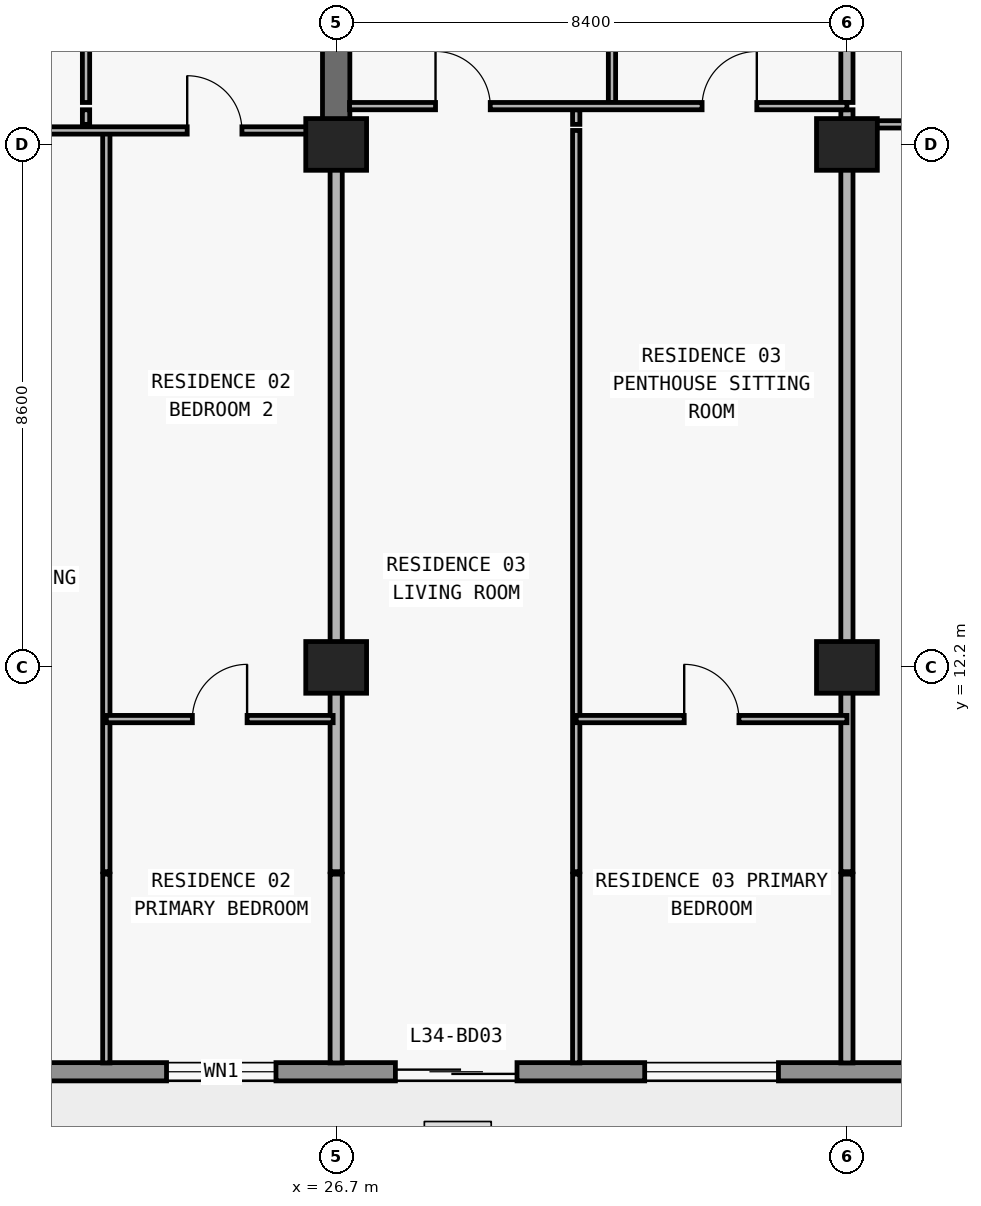
"""IFC4 building model, lengths in metres.
Left out: names, types, materials, properties, quantities, classifications, styles, units other than length and angle.
Written with IfcOpenShell. Run it as: python <this file> out.ifc"""

import sys

from ifc_helpers import new_model, si_unit, direction, frame, frame_2d, origin, origin_2d, place, context, subcontext, project, spatial, rectangle, extrude, element, fill, save


model = new_model("IFC4")
c1 = context("Model", 3, precision=1e-05, world=origin(), true_north=direction((0.0, 1.0)))
c2 = subcontext(c1, "Body", "Model", "MODEL_VIEW")
j1 = project(units=[si_unit("LENGTHUNIT", "METRE"), si_unit("PLANEANGLEUNIT", "RADIAN")], contexts=[c1])
p1 = place(None, origin())
s1 = spatial("IfcSite", under=j1, at=p1, CompositionType="ELEMENT")
p2 = place(p1, origin())
s2 = spatial("IfcBuilding", under=s1, at=p2, CompositionType="ELEMENT")
p3 = place(p2, frame((0.0, 0.0, 125.7)))
s3 = spatial("IfcBuildingStorey", under=s2, at=p3, CompositionType="ELEMENT", Elevation=125.7)
for number, where, z_axis, x_axis in (
    (1, (26.7, 12.2, 0.0), (0.0, 0.0, 1.0), (1.0, 0.0, 0.0)),
    (2, (35.1, 12.2, 0.0), (0.0, 0.0, 1.0), (1.0, 0.0, 0.0)),
    (3, (26.7, 20.8, 0.0), (0.0, 0.0, 1.0), (1.0, 0.0, 0.0)),
    (4, (35.1, 20.8, 0.0), (0.0, 0.0, 1.0), (1.0, 0.0, 0.0)),
):
    element("IfcColumn", number, at=place(p3, frame(where, z_axis=z_axis, x_axis=x_axis)), inside=s3, PredefinedType="COLUMN", context=c2, shape_type="SweptSolid", body=[
        extrude(rectangle(XDim=1.0, YDim=0.85, at=origin_2d()), origin(), (0.0, 0.0, 1.0), 3.05),
    ])
p4 = place(p3, frame((26.7, 20.8, 0.0), z_axis=(0.0, 0.0, 1.0), x_axis=(0.0, 1.0, 0.0)))
e5 = element("IfcWall", 5, at=p4, inside=s3, PredefinedType="SHEAR", context=c2, shape_type="SweptSolid", body=[
    extrude(rectangle(XDim=8.6, YDim=0.45, at=frame_2d((4.3, 0.0))), origin(), (0.0, 0.0, 1.0), 3.05),
])
p5 = place(p3, frame((70.1, 5.55, 0.0), z_axis=(0.0, 0.0, 1.0), x_axis=(-1.0, 0.0, 0.0)))
e6 = element("IfcWall", 6, at=p5, inside=s3, PredefinedType="STANDARD", context=c2, shape_type="SweptSolid", body=[
    extrude(rectangle(XDim=62.4, YDim=0.3, at=frame_2d((31.2, 0.0))), origin(), (0.0, 0.0, 1.0), 3.05),
])
p6 = place(p5, frame((57.226, 0.0, 0.0)))
e7 = element("IfcOpeningElement", 7, at=p6, cuts=e6, PredefinedType="OPENING", context=c2, shape_type="SweptSolid", body=[
    extrude(rectangle(XDim=2.0, YDim=2.3, at=frame_2d((1.0, 1.15))), frame((0.0, 0.16, 0.0), z_axis=(0.0, -1.0, 0.0), x_axis=(1.0, 0.0, 0.0)), (0.0, 0.0, 1.0), 0.32),
])
p7 = place(p5, frame((52.926, 0.0, 0.85)))
e8 = element("IfcOpeningElement", 8, at=p7, cuts=e6, PredefinedType="OPENING", context=c2, shape_type="SweptSolid", body=[
    extrude(rectangle(XDim=2.2, YDim=1.55, at=frame_2d((1.1, 0.775))), frame((0.0, 0.16, 0.0), z_axis=(0.0, -1.0, 0.0), x_axis=(1.0, 0.0, 0.0)), (0.0, 0.0, 1.0), 0.32),
])
p8 = place(p5, frame((48.49, 0.0, 0.0)))
e9 = element("IfcOpeningElement", 9, at=p8, cuts=e6, PredefinedType="OPENING", context=c2, shape_type="SweptSolid", body=[
    extrude(rectangle(XDim=2.0, YDim=2.3, at=frame_2d((1.0, 1.15))), frame((0.0, 0.16, 0.0), z_axis=(0.0, -1.0, 0.0), x_axis=(1.0, 0.0, 0.0)), (0.0, 0.0, 1.0), 0.32),
])
p9 = place(p5, frame((44.39, 0.0, 0.85)))
e10 = element("IfcOpeningElement", 10, at=p9, cuts=e6, PredefinedType="OPENING", context=c2, shape_type="SweptSolid", body=[
    extrude(rectangle(XDim=1.8, YDim=1.55, at=frame_2d((0.9, 0.775))), frame((0.0, 0.16, 0.0), z_axis=(0.0, -1.0, 0.0), x_axis=(1.0, 0.0, 0.0)), (0.0, 0.0, 1.0), 0.32),
])
p10 = place(p5, frame((40.426, 0.0, 0.0)))
e11 = element("IfcOpeningElement", 11, at=p10, cuts=e6, PredefinedType="OPENING", context=c2, shape_type="SweptSolid", body=[
    extrude(rectangle(XDim=2.0, YDim=2.3, at=frame_2d((1.0, 1.15))), frame((0.0, 0.16, 0.0), z_axis=(0.0, -1.0, 0.0), x_axis=(1.0, 0.0, 0.0)), (0.0, 0.0, 1.0), 0.32),
])
p11 = place(p5, frame((36.126, 0.0, 0.85)))
e12 = element("IfcOpeningElement", 12, at=p11, cuts=e6, PredefinedType="OPENING", context=c2, shape_type="SweptSolid", body=[
    extrude(rectangle(XDim=2.2, YDim=1.55, at=frame_2d((1.1, 0.775))), frame((0.0, 0.16, 0.0), z_axis=(0.0, -1.0, 0.0), x_axis=(1.0, 0.0, 0.0)), (0.0, 0.0, 1.0), 0.32),
])
p12 = place(p5, frame((31.91, 0.0, 0.0)))
e13 = element("IfcOpeningElement", 13, at=p12, cuts=e6, PredefinedType="OPENING", context=c2, shape_type="SweptSolid", body=[
    extrude(rectangle(XDim=2.0, YDim=2.3, at=frame_2d((1.0, 1.15))), frame((0.0, 0.16, 0.0), z_axis=(0.0, -1.0, 0.0), x_axis=(1.0, 0.0, 0.0)), (0.0, 0.0, 1.0), 0.32),
])
p13 = place(p5, frame((28.21, 0.0, 0.85)))
e14 = element("IfcOpeningElement", 14, at=p13, cuts=e6, PredefinedType="OPENING", context=c2, shape_type="SweptSolid", body=[
    extrude(rectangle(XDim=1.8, YDim=1.55, at=frame_2d((0.9, 0.775))), frame((0.0, 0.16, 0.0), z_axis=(0.0, -1.0, 0.0), x_axis=(1.0, 0.0, 0.0)), (0.0, 0.0, 1.0), 0.32),
])
p14 = place(p5, frame((24.426, 0.0, 0.0)))
e15 = element("IfcOpeningElement", 15, at=p14, cuts=e6, PredefinedType="OPENING", context=c2, shape_type="SweptSolid", body=[
    extrude(rectangle(XDim=2.0, YDim=2.3, at=frame_2d((1.0, 1.15))), frame((0.0, 0.16, 0.0), z_axis=(0.0, -1.0, 0.0), x_axis=(1.0, 0.0, 0.0)), (0.0, 0.0, 1.0), 0.32),
])
p15 = place(p5, frame((20.126, 0.0, 0.85)))
e16 = element("IfcOpeningElement", 16, at=p15, cuts=e6, PredefinedType="OPENING", context=c2, shape_type="SweptSolid", body=[
    extrude(rectangle(XDim=2.2, YDim=1.55, at=frame_2d((1.1, 0.775))), frame((0.0, 0.16, 0.0), z_axis=(0.0, -1.0, 0.0), x_axis=(1.0, 0.0, 0.0)), (0.0, 0.0, 1.0), 0.32),
])
p16 = place(p5, frame((15.69, 0.0, 0.0)))
e17 = element("IfcOpeningElement", 17, at=p16, cuts=e6, PredefinedType="OPENING", context=c2, shape_type="SweptSolid", body=[
    extrude(rectangle(XDim=2.0, YDim=2.3, at=frame_2d((1.0, 1.15))), frame((0.0, 0.16, 0.0), z_axis=(0.0, -1.0, 0.0), x_axis=(1.0, 0.0, 0.0)), (0.0, 0.0, 1.0), 0.32),
])
p17 = place(p5, frame((11.59, 0.0, 0.85)))
e18 = element("IfcOpeningElement", 18, at=p17, cuts=e6, PredefinedType="OPENING", context=c2, shape_type="SweptSolid", body=[
    extrude(rectangle(XDim=1.8, YDim=1.55, at=frame_2d((0.9, 0.775))), frame((0.0, 0.16, 0.0), z_axis=(0.0, -1.0, 0.0), x_axis=(1.0, 0.0, 0.0)), (0.0, 0.0, 1.0), 0.32),
])
p18 = place(p5, frame((7.626, 0.0, 0.0)))
e19 = element("IfcOpeningElement", 19, at=p18, cuts=e6, PredefinedType="OPENING", context=c2, shape_type="SweptSolid", body=[
    extrude(rectangle(XDim=2.0, YDim=2.3, at=frame_2d((1.0, 1.15))), frame((0.0, 0.16, 0.0), z_axis=(0.0, -1.0, 0.0), x_axis=(1.0, 0.0, 0.0)), (0.0, 0.0, 1.0), 0.32),
])
p19 = place(p5, frame((3.326, 0.0, 0.85)))
e20 = element("IfcOpeningElement", 20, at=p19, cuts=e6, PredefinedType="OPENING", context=c2, shape_type="SweptSolid", body=[
    extrude(rectangle(XDim=2.2, YDim=1.55, at=frame_2d((1.1, 0.775))), frame((0.0, 0.16, 0.0), z_axis=(0.0, -1.0, 0.0), x_axis=(1.0, 0.0, 0.0)), (0.0, 0.0, 1.0), 0.32),
])
p20 = place(p3, frame((22.586, 21.13, 0.0), z_axis=(0.0, 0.0, 1.0), x_axis=(0.0, 1.0, 0.0)))
e21 = element("IfcWall", 21, at=p20, inside=s3, PredefinedType="PARTITIONING", context=c2, shape_type="SweptSolid", body=[
    extrude(rectangle(XDim=0.24, YDim=0.12, at=frame_2d((0.12, 0.0))), origin(), (0.0, 0.0, 1.0), 3.05),
])
p21 = place(p3, frame((22.586, 21.49, 0.0), z_axis=(0.0, 0.0, 1.0), x_axis=(0.0, 1.0, 0.0)))
e22 = element("IfcWall", 22, at=p21, inside=s3, PredefinedType="PARTITIONING", context=c2, shape_type="SweptSolid", body=[
    extrude(rectangle(XDim=4.69, YDim=0.12, at=frame_2d((2.345, 0.0))), origin(), (0.0, 0.0, 1.0), 3.05),
])
p22 = place(p21, frame((1.895, 0.0, 0.0)))
e23 = element("IfcOpeningElement", 23, at=p22, cuts=e22, PredefinedType="OPENING", context=c2, shape_type="SweptSolid", body=[
    extrude(rectangle(XDim=0.9, YDim=2.15, at=frame_2d((0.45, 1.075))), frame((0.0, 0.07, 0.0), z_axis=(0.0, -1.0, 0.0), x_axis=(1.0, 0.0, 0.0)), (0.0, 0.0, 1.0), 0.14),
])
p23 = place(p3, frame((22.92, 5.695, 0.0), z_axis=(0.0, 0.0, 1.0), x_axis=(0.0, 1.0, 0.0)))
e24 = element("IfcWall", 24, at=p23, inside=s3, PredefinedType="PARTITIONING", context=c2, shape_type="SweptSolid", body=[
    extrude(rectangle(XDim=3.105, YDim=0.12, at=frame_2d((1.552, 0.0))), origin(), (0.0, 0.0, 1.0), 3.05),
])
p24 = place(p3, frame((22.92, 8.84, 0.0), z_axis=(0.0, 0.0, 1.0), x_axis=(0.0, 1.0, 0.0)))
e25 = element("IfcWall", 25, at=p24, inside=s3, PredefinedType="PARTITIONING", context=c2, shape_type="SweptSolid", body=[
    extrude(rectangle(XDim=12.19, YDim=0.12, at=frame_2d((6.095, 0.0))), origin(), (0.0, 0.0, 1.0), 3.05),
])
p25 = place(p3, frame((26.7, 5.695, 0.0), z_axis=(0.0, 0.0, 1.0), x_axis=(0.0, 1.0, 0.0)))
e26 = element("IfcWall", 26, at=p25, inside=s3, PredefinedType="PARTITIONING", context=c2, shape_type="SweptSolid", body=[
    extrude(rectangle(XDim=3.105, YDim=0.2, at=frame_2d((1.552, 0.0))), origin(), (0.0, 0.0, 1.0), 3.05),
])
p26 = place(p3, frame((26.7, 8.84, 0.0), z_axis=(0.0, 0.0, 1.0), x_axis=(0.0, 1.0, 0.0)))
e27 = element("IfcWall", 27, at=p26, inside=s3, PredefinedType="PARTITIONING", context=c2, shape_type="SweptSolid", body=[
    extrude(rectangle(XDim=11.955, YDim=0.2, at=frame_2d((5.978, 0.0))), origin(), (0.0, 0.0, 1.0), 2.174),
])
p27 = place(p3, frame((30.648, 5.695, 0.0), z_axis=(0.0, 0.0, 1.0), x_axis=(0.0, 1.0, 0.0)))
e28 = element("IfcWall", 28, at=p27, inside=s3, PredefinedType="PARTITIONING", context=c2, shape_type="SweptSolid", body=[
    extrude(rectangle(XDim=3.105, YDim=0.12, at=frame_2d((1.552, 0.0))), origin(), (0.0, 0.0, 1.0), 3.05),
])
p28 = place(p3, frame((30.648, 8.84, 0.0), z_axis=(0.0, 0.0, 1.0), x_axis=(0.0, 1.0, 0.0)))
e29 = element("IfcWall", 29, at=p28, inside=s3, PredefinedType="PARTITIONING", context=c2, shape_type="SweptSolid", body=[
    extrude(rectangle(XDim=12.19, YDim=0.12, at=frame_2d((6.095, 0.0))), origin(), (0.0, 0.0, 1.0), 3.05),
])
p29 = place(p3, frame((30.648, 21.13, 0.0), z_axis=(0.0, 0.0, 1.0), x_axis=(0.0, 1.0, 0.0)))
e30 = element("IfcWall", 30, at=p29, inside=s3, PredefinedType="PARTITIONING", context=c2, shape_type="SweptSolid", body=[
    extrude(rectangle(XDim=0.24, YDim=0.12, at=frame_2d((0.12, 0.0))), origin(), (0.0, 0.0, 1.0), 3.05),
])
p30 = place(p3, frame((31.236, 21.49, 0.0), z_axis=(0.0, 0.0, 1.0), x_axis=(0.0, 1.0, 0.0)))
e31 = element("IfcWall", 31, at=p30, inside=s3, PredefinedType="PARTITIONING", context=c2, shape_type="SweptSolid", body=[
    extrude(rectangle(XDim=4.69, YDim=0.12, at=frame_2d((2.345, 0.0))), origin(), (0.0, 0.0, 1.0), 3.05),
])
p31 = place(p30, frame((1.895, 0.0, 0.0)))
e32 = element("IfcOpeningElement", 32, at=p31, cuts=e31, PredefinedType="OPENING", context=c2, shape_type="SweptSolid", body=[
    extrude(rectangle(XDim=0.9, YDim=2.15, at=frame_2d((0.45, 1.075))), frame((0.0, 0.07, 0.0), z_axis=(0.0, -1.0, 0.0), x_axis=(1.0, 0.0, 0.0)), (0.0, 0.0, 1.0), 0.14),
])
p32 = place(p3, frame((35.1, 5.695, 0.0), z_axis=(0.0, 0.0, 1.0), x_axis=(0.0, 1.0, 0.0)))
e33 = element("IfcWall", 33, at=p32, inside=s3, PredefinedType="PARTITIONING", context=c2, shape_type="SweptSolid", body=[
    extrude(rectangle(XDim=3.105, YDim=0.2, at=frame_2d((1.552, 0.0))), origin(), (0.0, 0.0, 1.0), 3.05),
])
p33 = place(p3, frame((35.1, 8.84, 0.0), z_axis=(0.0, 0.0, 1.0), x_axis=(0.0, 1.0, 0.0)))
e34 = element("IfcWall", 34, at=p33, inside=s3, PredefinedType="PARTITIONING", context=c2, shape_type="SweptSolid", body=[
    extrude(rectangle(XDim=12.19, YDim=0.2, at=frame_2d((6.095, 0.0))), origin(), (0.0, 0.0, 1.0), 2.174),
])
p34 = place(p3, frame((35.1, 21.13, 0.0), z_axis=(0.0, 0.0, 1.0), x_axis=(0.0, 1.0, 0.0)))
e35 = element("IfcWall", 35, at=p34, inside=s3, PredefinedType="PARTITIONING", context=c2, shape_type="SweptSolid", body=[
    extrude(rectangle(XDim=0.24, YDim=0.2, at=frame_2d((0.12, 0.0))), origin(), (0.0, 0.0, 1.0), 2.174),
])
p35 = place(p3, frame((35.1, 21.49, 0.0), z_axis=(0.0, 0.0, 1.0), x_axis=(0.0, 1.0, 0.0)))
e36 = element("IfcWall", 36, at=p35, inside=s3, PredefinedType="PARTITIONING", context=c2, shape_type="SweptSolid", body=[
    extrude(rectangle(XDim=4.69, YDim=0.2, at=frame_2d((2.345, 0.0))), origin(), (0.0, 0.0, 1.0), 2.174),
])
p36 = place(p3, frame((22.92, 11.35, 0.0), z_axis=(0.0, 0.0, 1.0), x_axis=(1.0, 0.0, 0.0)))
e37 = element("IfcWall", 37, at=p36, inside=s3, PredefinedType="PARTITIONING", context=c2, shape_type="SweptSolid", body=[
    extrude(rectangle(XDim=3.73, YDim=0.12, at=frame_2d((1.865, 0.0))), origin(), (0.0, 0.0, 1.0), 3.05),
])
p37 = place(p36, frame((1.415, 0.0, 0.0)))
e38 = element("IfcOpeningElement", 38, at=p37, cuts=e37, PredefinedType="OPENING", context=c2, shape_type="SweptSolid", body=[
    extrude(rectangle(XDim=0.9, YDim=2.15, at=frame_2d((0.45, 1.075))), frame((0.0, 0.07, 0.0), z_axis=(0.0, -1.0, 0.0), x_axis=(1.0, 0.0, 0.0)), (0.0, 0.0, 1.0), 0.14),
])
p38 = place(p3, frame((30.648, 11.35, 0.0), z_axis=(0.0, 0.0, 1.0), x_axis=(1.0, 0.0, 0.0)))
e39 = element("IfcWall", 39, at=p38, inside=s3, PredefinedType="PARTITIONING", context=c2, shape_type="SweptSolid", body=[
    extrude(rectangle(XDim=4.452, YDim=0.12, at=frame_2d((2.226, 0.0))), origin(), (0.0, 0.0, 1.0), 3.05),
])
p39 = place(p38, frame((1.776, 0.0, 0.0)))
e40 = element("IfcOpeningElement", 40, at=p39, cuts=e39, PredefinedType="OPENING", context=c2, shape_type="SweptSolid", body=[
    extrude(rectangle(XDim=0.9, YDim=2.15, at=frame_2d((0.45, 1.075))), frame((0.0, 0.07, 0.0), z_axis=(0.0, -1.0, 0.0), x_axis=(1.0, 0.0, 0.0)), (0.0, 0.0, 1.0), 0.14),
])
p40 = place(p3, frame((18.3, 21.03, 0.0), z_axis=(0.0, 0.0, 1.0), x_axis=(1.0, 0.0, 0.0)))
e41 = element("IfcWall", 41, at=p40, inside=s3, PredefinedType="PARTITIONING", context=c2, shape_type="SweptSolid", body=[
    extrude(rectangle(XDim=8.18, YDim=0.12, at=frame_2d((4.09, 0.0))), origin(), (0.0, 0.0, 1.0), 2.174),
])
p41 = place(p40, frame((1.693, 0.0, 0.0)))
e42 = element("IfcOpeningElement", 42, at=p41, cuts=e41, PredefinedType="OPENING", context=c2, shape_type="SweptSolid", body=[
    extrude(rectangle(XDim=0.9, YDim=2.124, at=frame_2d((0.45, 1.062))), frame((0.0, 0.07, 0.0), z_axis=(0.0, -1.0, 0.0), x_axis=(1.0, 0.0, 0.0)), (0.0, 0.0, 1.0), 0.14),
])
p42 = place(p40, frame((5.95, 0.0, 0.0)))
e43 = element("IfcOpeningElement", 43, at=p42, cuts=e41, PredefinedType="OPENING", context=c2, shape_type="SweptSolid", body=[
    extrude(rectangle(XDim=0.9, YDim=2.124, at=frame_2d((0.45, 1.062))), frame((0.0, 0.07, 0.0), z_axis=(0.0, -1.0, 0.0), x_axis=(1.0, 0.0, 0.0)), (0.0, 0.0, 1.0), 0.14),
])
p43 = place(p3, frame((35.1, 21.13, 0.0), z_axis=(0.0, 0.0, 1.0), x_axis=(1.0, 0.0, 0.0)))
e44 = element("IfcWall", 44, at=p43, inside=s3, PredefinedType="PARTITIONING", context=c2, shape_type="SweptSolid", body=[
    extrude(rectangle(XDim=7.6, YDim=0.12, at=frame_2d((3.8, 0.0))), origin(), (0.0, 0.0, 1.0), 2.174),
])
p44 = place(p43, frame((1.64, 0.0, 0.0)))
e45 = element("IfcOpeningElement", 45, at=p44, cuts=e44, PredefinedType="OPENING", context=c2, shape_type="SweptSolid", body=[
    extrude(rectangle(XDim=0.9, YDim=2.124, at=frame_2d((0.45, 1.062))), frame((0.0, 0.07, 0.0), z_axis=(0.0, -1.0, 0.0), x_axis=(1.0, 0.0, 0.0)), (0.0, 0.0, 1.0), 0.14),
])
p45 = place(p43, frame((5.527, 0.0, 0.0)))
e46 = element("IfcOpeningElement", 46, at=p45, cuts=e44, PredefinedType="OPENING", context=c2, shape_type="SweptSolid", body=[
    extrude(rectangle(XDim=0.9, YDim=2.124, at=frame_2d((0.45, 1.062))), frame((0.0, 0.07, 0.0), z_axis=(0.0, -1.0, 0.0), x_axis=(1.0, 0.0, 0.0)), (0.0, 0.0, 1.0), 0.14),
])
p46 = place(p3, frame((26.92, 21.43, 0.0), z_axis=(0.0, 0.0, 1.0), x_axis=(1.0, 0.0, 0.0)))
e47 = element("IfcWall", 47, at=p46, inside=s3, PredefinedType="PARTITIONING", context=c2, shape_type="SweptSolid", body=[
    extrude(rectangle(XDim=8.18, YDim=0.12, at=frame_2d((4.09, 0.0))), origin(), (0.0, 0.0, 1.0), 3.05),
])
p47 = place(p46, frame((1.414, 0.0, 0.0)))
e48 = element("IfcOpeningElement", 48, at=p47, cuts=e47, PredefinedType="OPENING", context=c2, shape_type="SweptSolid", body=[
    extrude(rectangle(XDim=0.9, YDim=2.15, at=frame_2d((0.45, 1.075))), frame((0.0, 0.07, 0.0), z_axis=(0.0, -1.0, 0.0), x_axis=(1.0, 0.0, 0.0)), (0.0, 0.0, 1.0), 0.14),
])
p48 = place(p46, frame((5.798, 0.0, 0.0)))
e49 = element("IfcOpeningElement", 49, at=p48, cuts=e47, PredefinedType="OPENING", context=c2, shape_type="SweptSolid", body=[
    extrude(rectangle(XDim=0.9, YDim=2.15, at=frame_2d((0.45, 1.075))), frame((0.0, 0.07, 0.0), z_axis=(0.0, -1.0, 0.0), x_axis=(1.0, 0.0, 0.0)), (0.0, 0.0, 1.0), 0.14),
])
p49 = place(p9, origin())
e50 = element("IfcWindow", 50, at=p49, inside=s3, PartitioningType="SINGLE_PANEL", PredefinedType="WINDOW", context=c2, shape_type="SweptSolid", body=[
    extrude(rectangle(XDim=1.8, YDim=1.55, at=frame_2d((0.9, 0.775))), frame((0.0, 0.03, 0.0), z_axis=(0.0, -1.0, 0.0), x_axis=(1.0, 0.0, 0.0)), (0.0, 0.0, 1.0), 0.06),
])
fill(e10, e50)
p50 = place(p10, origin())
e51 = element("IfcDoor", 51, at=p50, inside=s3, OperationType="DOUBLE_DOOR_SLIDING", PredefinedType="DOOR", context=c2, shape_type="SweptSolid", body=[
    extrude(rectangle(XDim=2.0, YDim=2.3, at=frame_2d((1.0, 1.15))), frame((0.0, 0.025, 0.0), z_axis=(0.0, -1.0, 0.0), x_axis=(1.0, 0.0, 0.0)), (0.0, 0.0, 1.0), 0.05),
])
fill(e11, e51)
p51 = place(p11, origin())
e52 = element("IfcWindow", 52, at=p51, inside=s3, PartitioningType="SINGLE_PANEL", PredefinedType="WINDOW", context=c2, shape_type="SweptSolid", body=[
    extrude(rectangle(XDim=2.2, YDim=1.55, at=frame_2d((1.1, 0.775))), frame((0.0, 0.03, 0.0), z_axis=(0.0, -1.0, 0.0), x_axis=(1.0, 0.0, 0.0)), (0.0, 0.0, 1.0), 0.06),
])
fill(e12, e52)
p52 = place(p42, origin())
e53 = element("IfcDoor", 53, at=p52, inside=s3, OperationType="SINGLE_SWING_LEFT", PredefinedType="DOOR", context=c2, shape_type="SweptSolid", body=[
    extrude(rectangle(XDim=0.9, YDim=2.124, at=frame_2d((0.45, 1.062))), frame((0.0, 0.025, 0.0), z_axis=(0.0, -1.0, 0.0), x_axis=(1.0, 0.0, 0.0)), (0.0, 0.0, 1.0), 0.05),
])
fill(e43, e53)
p53 = place(p37, origin())
e54 = element("IfcDoor", 54, at=p53, inside=s3, OperationType="SINGLE_SWING_RIGHT", PredefinedType="DOOR", context=c2, shape_type="SweptSolid", body=[
    extrude(rectangle(XDim=0.9, YDim=2.15, at=frame_2d((0.45, 1.075))), frame((0.0, 0.025, 0.0), z_axis=(0.0, -1.0, 0.0), x_axis=(1.0, 0.0, 0.0)), (0.0, 0.0, 1.0), 0.05),
])
fill(e38, e54)
p54 = place(p47, origin())
e55 = element("IfcDoor", 55, at=p54, inside=s3, OperationType="SINGLE_SWING_LEFT", PredefinedType="DOOR", context=c2, shape_type="SweptSolid", body=[
    extrude(rectangle(XDim=0.9, YDim=2.15, at=frame_2d((0.45, 1.075))), frame((0.0, 0.025, 0.0), z_axis=(0.0, -1.0, 0.0), x_axis=(1.0, 0.0, 0.0)), (0.0, 0.0, 1.0), 0.05),
])
fill(e48, e55)
p55 = place(p48, origin())
e56 = element("IfcDoor", 56, at=p55, inside=s3, OperationType="SINGLE_SWING_RIGHT", PredefinedType="DOOR", context=c2, shape_type="SweptSolid", body=[
    extrude(rectangle(XDim=0.9, YDim=2.15, at=frame_2d((0.45, 1.075))), frame((0.0, 0.025, 0.0), z_axis=(0.0, -1.0, 0.0), x_axis=(1.0, 0.0, 0.0)), (0.0, 0.0, 1.0), 0.05),
])
fill(e49, e56)
p56 = place(p39, origin())
e57 = element("IfcDoor", 57, at=p56, inside=s3, OperationType="SINGLE_SWING_LEFT", PredefinedType="DOOR", context=c2, shape_type="SweptSolid", body=[
    extrude(rectangle(XDim=0.9, YDim=2.15, at=frame_2d((0.45, 1.075))), frame((0.0, 0.025, 0.0), z_axis=(0.0, -1.0, 0.0), x_axis=(1.0, 0.0, 0.0)), (0.0, 0.0, 1.0), 0.05),
])
fill(e40, e57)
save(model, sys.argv[1])
